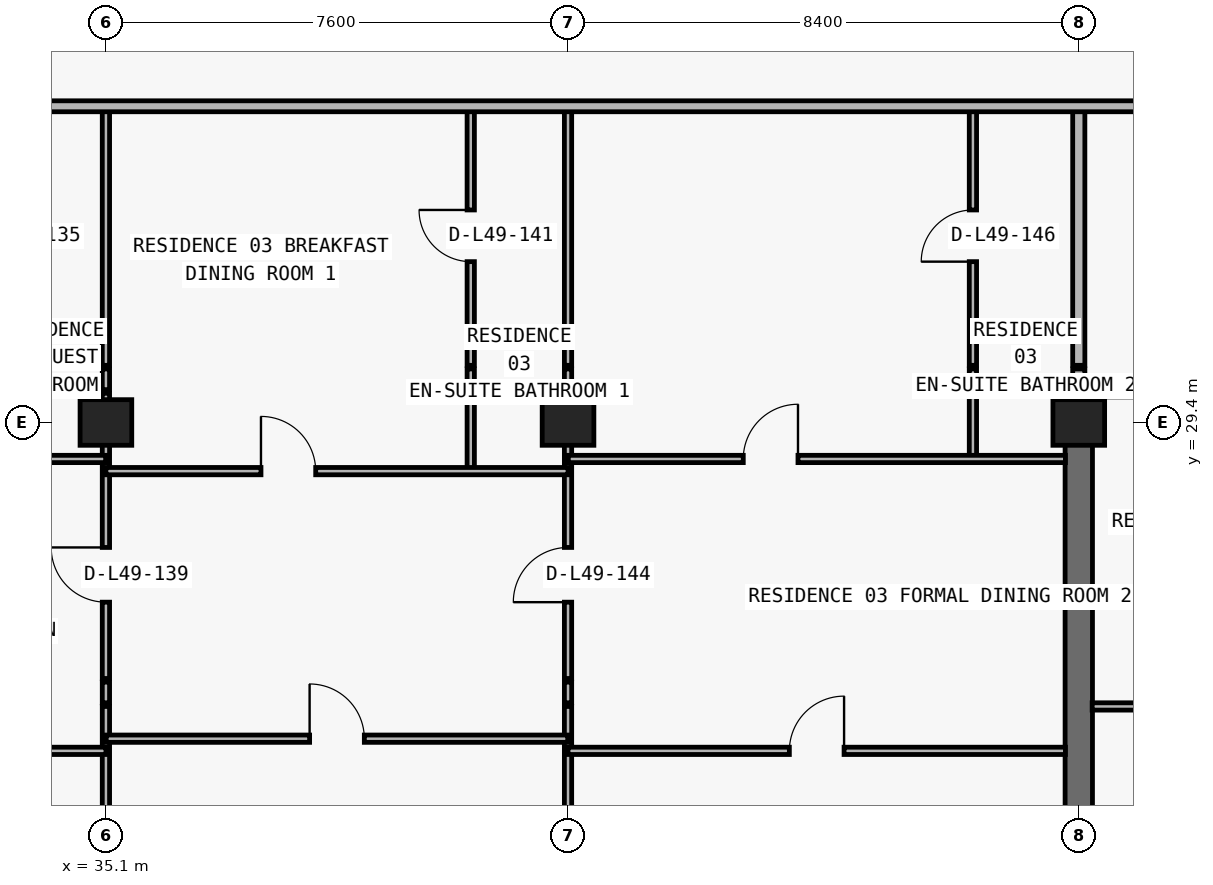
"""IFC4 building model, lengths in metres.
Left out: names, types, materials, properties, quantities, classifications, styles, units other than length and angle.
Written with IfcOpenShell. Run it as: python <this file> out.ifc"""

import sys

from ifc_helpers import new_model, si_unit, direction, frame, frame_2d, origin, origin_2d, place, context, subcontext, project, spatial, rectangle, extrude, element, fill, save


model = new_model("IFC4")
c1 = context("Model", 3, precision=1e-05, world=origin(), true_north=direction((0.0, 1.0)))
c2 = subcontext(c1, "Body", "Model", "MODEL_VIEW")
j1 = project(units=[si_unit("LENGTHUNIT", "METRE"), si_unit("PLANEANGLEUNIT", "RADIAN")], contexts=[c1])
p1 = place(None, origin())
s1 = spatial("IfcSite", under=j1, at=p1, CompositionType="ELEMENT")
p2 = place(p1, origin())
s2 = spatial("IfcBuilding", under=s1, at=p2, CompositionType="ELEMENT")
p3 = place(p2, frame((0.0, 0.0, 177.0)))
s3 = spatial("IfcBuildingStorey", under=s2, at=p3, CompositionType="ELEMENT", Elevation=177.0)
for number, where, z_axis, x_axis in (
    (1, (35.1, 29.4, 0.0), (0.0, 0.0, 1.0), (1.0, 0.0, 0.0)),
    (2, (42.7, 29.4, 0.0), (0.0, 0.0, 1.0), (1.0, 0.0, 0.0)),
    (3, (51.1, 29.4, 0.0), (0.0, 0.0, 1.0), (1.0, 0.0, 0.0)),
):
    element("IfcColumn", number, at=place(p3, frame(where, z_axis=z_axis, x_axis=x_axis)), inside=s3, PredefinedType="COLUMN", context=c2, shape_type="SweptSolid", body=[
        extrude(rectangle(XDim=0.85, YDim=0.75, at=origin_2d()), origin(), (0.0, 0.0, 1.0), 3.05),
    ])
p4 = place(p3, frame((51.1, 20.8, 0.0), z_axis=(0.0, 0.0, 1.0), x_axis=(0.0, 1.0, 0.0)))
e4 = element("IfcWall", 4, at=p4, inside=s3, PredefinedType="SHEAR", context=c2, shape_type="SweptSolid", body=[
    extrude(rectangle(XDim=8.6, YDim=0.45, at=frame_2d((4.3, 0.0))), origin(), (0.0, 0.0, 1.0), 3.05),
])
p5 = place(p3, frame((35.1, 11.24, 0.0), z_axis=(0.0, 0.0, 1.0), x_axis=(0.0, 1.0, 0.0)))
e5 = element("IfcWall", 5, at=p5, inside=s3, PredefinedType="PARTITIONING", context=c2, shape_type="SweptSolid", body=[
    extrude(rectangle(XDim=13.49, YDim=0.12, at=frame_2d((6.745, 0.0))), origin(), (0.0, 0.0, 1.0), 2.263),
])
p6 = place(p3, frame((35.1, 24.79, 0.0), z_axis=(0.0, 0.0, 1.0), x_axis=(0.0, 1.0, 0.0)))
e6 = element("IfcWall", 6, at=p6, inside=s3, PredefinedType="PARTITIONING", context=c2, shape_type="SweptSolid", body=[
    extrude(rectangle(XDim=0.34, YDim=0.12, at=frame_2d((0.17, 0.0))), origin(), (0.0, 0.0, 1.0), 2.263),
])
p7 = place(p3, frame((35.1, 25.19, 0.0), z_axis=(0.0, 0.0, 1.0), x_axis=(0.0, 1.0, 0.0)))
e7 = element("IfcWall", 7, at=p7, inside=s3, PredefinedType="PARTITIONING", context=c2, shape_type="SweptSolid", body=[
    extrude(rectangle(XDim=4.69, YDim=0.12, at=frame_2d((2.345, 0.0))), origin(), (0.0, 0.0, 1.0), 2.263),
])
p8 = place(p7, frame((1.255, 0.0, 0.0)))
e8 = element("IfcOpeningElement", 8, at=p8, cuts=e7, PredefinedType="OPENING", context=c2, shape_type="SweptSolid", body=[
    extrude(rectangle(XDim=0.9, YDim=2.15, at=frame_2d((0.45, 1.075))), frame((0.0, 0.07, 0.0), z_axis=(0.0, -1.0, 0.0), x_axis=(1.0, 0.0, 0.0)), (0.0, 0.0, 1.0), 0.14),
])
p9 = place(p3, frame((35.1, 29.94, 0.0), z_axis=(0.0, 0.0, 1.0), x_axis=(0.0, 1.0, 0.0)))
e9 = element("IfcWall", 9, at=p9, inside=s3, PredefinedType="PARTITIONING", context=c2, shape_type="SweptSolid", body=[
    extrude(rectangle(XDim=0.34, YDim=0.12, at=frame_2d((0.17, 0.0))), origin(), (0.0, 0.0, 1.0), 2.263),
])
p10 = place(p3, frame((35.1, 30.34, 0.0), z_axis=(0.0, 0.0, 1.0), x_axis=(0.0, 1.0, 0.0)))
e10 = element("IfcWall", 10, at=p10, inside=s3, PredefinedType="PARTITIONING", context=c2, shape_type="SweptSolid", body=[
    extrude(rectangle(XDim=4.26, YDim=0.12, at=frame_2d((2.13, 0.0))), origin(), (0.0, 0.0, 1.0), 2.263),
])
p11 = place(p3, frame((41.1, 28.6, 0.0), z_axis=(0.0, 0.0, 1.0), x_axis=(0.0, 1.0, 0.0)))
e11 = element("IfcWall", 11, at=p11, inside=s3, PredefinedType="PARTITIONING", context=c2, shape_type="SweptSolid", body=[
    extrude(rectangle(XDim=1.28, YDim=0.12, at=frame_2d((0.64, 0.0))), origin(), (0.0, 0.0, 1.0), 3.05),
])
p12 = place(p3, frame((41.1, 29.94, 0.0), z_axis=(0.0, 0.0, 1.0), x_axis=(0.0, 1.0, 0.0)))
e12 = element("IfcWall", 12, at=p12, inside=s3, PredefinedType="PARTITIONING", context=c2, shape_type="SweptSolid", body=[
    extrude(rectangle(XDim=0.34, YDim=0.12, at=frame_2d((0.17, 0.0))), origin(), (0.0, 0.0, 1.0), 3.05),
])
p13 = place(p3, frame((41.1, 30.34, 0.0), z_axis=(0.0, 0.0, 1.0), x_axis=(0.0, 1.0, 0.0)))
e13 = element("IfcWall", 13, at=p13, inside=s3, PredefinedType="PARTITIONING", context=c2, shape_type="SweptSolid", body=[
    extrude(rectangle(XDim=4.26, YDim=0.12, at=frame_2d((2.13, 0.0))), origin(), (0.0, 0.0, 1.0), 3.05),
])
p14 = place(p13, frame((1.705, 0.0, 0.0)))
e14 = element("IfcOpeningElement", 14, at=p14, cuts=e13, PredefinedType="OPENING", context=c2, shape_type="SweptSolid", body=[
    extrude(rectangle(XDim=0.85, YDim=2.1, at=frame_2d((0.425, 1.05))), frame((0.0, 0.07, 0.0), z_axis=(0.0, -1.0, 0.0), x_axis=(1.0, 0.0, 0.0)), (0.0, 0.0, 1.0), 0.14),
])
p15 = place(p3, frame((42.7, 11.24, 0.0), z_axis=(0.0, 0.0, 1.0), x_axis=(0.0, 1.0, 0.0)))
e15 = element("IfcWall", 15, at=p15, inside=s3, PredefinedType="PARTITIONING", context=c2, shape_type="SweptSolid", body=[
    extrude(rectangle(XDim=13.49, YDim=0.12, at=frame_2d((6.745, 0.0))), origin(), (0.0, 0.0, 1.0), 2.263),
])
p16 = place(p3, frame((42.7, 24.79, 0.0), z_axis=(0.0, 0.0, 1.0), x_axis=(0.0, 1.0, 0.0)))
e16 = element("IfcWall", 16, at=p16, inside=s3, PredefinedType="PARTITIONING", context=c2, shape_type="SweptSolid", body=[
    extrude(rectangle(XDim=0.34, YDim=0.12, at=frame_2d((0.17, 0.0))), origin(), (0.0, 0.0, 1.0), 2.263),
])
p17 = place(p3, frame((42.7, 25.19, 0.0), z_axis=(0.0, 0.0, 1.0), x_axis=(0.0, 1.0, 0.0)))
e17 = element("IfcWall", 17, at=p17, inside=s3, PredefinedType="PARTITIONING", context=c2, shape_type="SweptSolid", body=[
    extrude(rectangle(XDim=4.69, YDim=0.12, at=frame_2d((2.345, 0.0))), origin(), (0.0, 0.0, 1.0), 2.263),
])
p18 = place(p17, frame((1.255, 0.0, 0.0)))
e18 = element("IfcOpeningElement", 18, at=p18, cuts=e17, PredefinedType="OPENING", context=c2, shape_type="SweptSolid", body=[
    extrude(rectangle(XDim=0.9, YDim=2.15, at=frame_2d((0.45, 1.075))), frame((0.0, 0.07, 0.0), z_axis=(0.0, -1.0, 0.0), x_axis=(1.0, 0.0, 0.0)), (0.0, 0.0, 1.0), 0.14),
])
p19 = place(p3, frame((42.7, 29.94, 0.0), z_axis=(0.0, 0.0, 1.0), x_axis=(0.0, 1.0, 0.0)))
e19 = element("IfcWall", 19, at=p19, inside=s3, PredefinedType="PARTITIONING", context=c2, shape_type="SweptSolid", body=[
    extrude(rectangle(XDim=0.34, YDim=0.12, at=frame_2d((0.17, 0.0))), origin(), (0.0, 0.0, 1.0), 2.263),
])
p20 = place(p3, frame((42.7, 30.34, 0.0), z_axis=(0.0, 0.0, 1.0), x_axis=(0.0, 1.0, 0.0)))
e20 = element("IfcWall", 20, at=p20, inside=s3, PredefinedType="PARTITIONING", context=c2, shape_type="SweptSolid", body=[
    extrude(rectangle(XDim=4.26, YDim=0.12, at=frame_2d((2.13, 0.0))), origin(), (0.0, 0.0, 1.0), 2.263),
])
p21 = place(p3, frame((49.359, 28.8, 0.0), z_axis=(0.0, 0.0, 1.0), x_axis=(0.0, 1.0, 0.0)))
e21 = element("IfcWall", 21, at=p21, inside=s3, PredefinedType="PARTITIONING", context=c2, shape_type="SweptSolid", body=[
    extrude(rectangle(XDim=1.08, YDim=0.12, at=frame_2d((0.54, 0.0))), origin(), (0.0, 0.0, 1.0), 3.05),
])
p22 = place(p3, frame((49.359, 29.94, 0.0), z_axis=(0.0, 0.0, 1.0), x_axis=(0.0, 1.0, 0.0)))
e22 = element("IfcWall", 22, at=p22, inside=s3, PredefinedType="PARTITIONING", context=c2, shape_type="SweptSolid", body=[
    extrude(rectangle(XDim=0.34, YDim=0.12, at=frame_2d((0.17, 0.0))), origin(), (0.0, 0.0, 1.0), 3.05),
])
p23 = place(p3, frame((49.359, 30.34, 0.0), z_axis=(0.0, 0.0, 1.0), x_axis=(0.0, 1.0, 0.0)))
e23 = element("IfcWall", 23, at=p23, inside=s3, PredefinedType="PARTITIONING", context=c2, shape_type="SweptSolid", body=[
    extrude(rectangle(XDim=4.26, YDim=0.12, at=frame_2d((2.13, 0.0))), origin(), (0.0, 0.0, 1.0), 3.05),
])
p24 = place(p23, frame((1.705, 0.0, 0.0)))
e24 = element("IfcOpeningElement", 24, at=p24, cuts=e23, PredefinedType="OPENING", context=c2, shape_type="SweptSolid", body=[
    extrude(rectangle(XDim=0.85, YDim=2.1, at=frame_2d((0.425, 1.05))), frame((0.0, 0.07, 0.0), z_axis=(0.0, -1.0, 0.0), x_axis=(1.0, 0.0, 0.0)), (0.0, 0.0, 1.0), 0.14),
])
p25 = place(p3, frame((51.1, 29.405, 0.0), z_axis=(0.0, 0.0, 1.0), x_axis=(0.0, 1.0, 0.0)))
e25 = element("IfcWall", 25, at=p25, inside=s3, PredefinedType="PARTITIONING", context=c2, shape_type="SweptSolid", body=[
    extrude(rectangle(XDim=0.475, YDim=0.2, at=frame_2d((0.237, 0.0))), origin(), (0.0, 0.0, 1.0), 2.335),
])
p26 = place(p3, frame((51.1, 29.94, 0.0), z_axis=(0.0, 0.0, 1.0), x_axis=(0.0, 1.0, 0.0)))
e26 = element("IfcWall", 26, at=p26, inside=s3, PredefinedType="PARTITIONING", context=c2, shape_type="SweptSolid", body=[
    extrude(rectangle(XDim=0.34, YDim=0.2, at=frame_2d((0.17, 0.0))), origin(), (0.0, 0.0, 1.0), 2.335),
])
p27 = place(p3, frame((51.1, 30.34, 0.0), z_axis=(0.0, 0.0, 1.0), x_axis=(0.0, 1.0, 0.0)))
e27 = element("IfcWall", 27, at=p27, inside=s3, PredefinedType="PARTITIONING", context=c2, shape_type="SweptSolid", body=[
    extrude(rectangle(XDim=4.26, YDim=0.2, at=frame_2d((2.13, 0.0))), origin(), (0.0, 0.0, 1.0), 2.335),
])
p28 = place(p3, frame((26.92, 24.0, 0.0), z_axis=(0.0, 0.0, 1.0), x_axis=(1.0, 0.0, 0.0)))
e28 = element("IfcWall", 28, at=p28, inside=s3, PredefinedType="PARTITIONING", context=c2, shape_type="SweptSolid", body=[
    extrude(rectangle(XDim=8.18, YDim=0.12, at=frame_2d((4.09, 0.0))), origin(), (0.0, 0.0, 1.0), 3.05),
])
p29 = place(p28, frame((1.33, 0.0, 0.0)))
e29 = element("IfcOpeningElement", 29, at=p29, cuts=e28, PredefinedType="OPENING", context=c2, shape_type="SweptSolid", body=[
    extrude(rectangle(XDim=0.9, YDim=2.15, at=frame_2d((0.45, 1.075))), frame((0.0, 0.07, 0.0), z_axis=(0.0, -1.0, 0.0), x_axis=(1.0, 0.0, 0.0)), (0.0, 0.0, 1.0), 0.14),
])
p30 = place(p3, frame((42.7, 24.0, 0.0), z_axis=(0.0, 0.0, 1.0), x_axis=(1.0, 0.0, 0.0)))
e30 = element("IfcWall", 30, at=p30, inside=s3, PredefinedType="PARTITIONING", context=c2, shape_type="SweptSolid", body=[
    extrude(rectangle(XDim=8.18, YDim=0.12, at=frame_2d((4.09, 0.0))), origin(), (0.0, 0.0, 1.0), 3.05),
])
p31 = place(p30, frame((3.64, 0.0, 0.0)))
e31 = element("IfcOpeningElement", 31, at=p31, cuts=e30, PredefinedType="OPENING", context=c2, shape_type="SweptSolid", body=[
    extrude(rectangle(XDim=0.9, YDim=2.15, at=frame_2d((0.45, 1.075))), frame((0.0, 0.07, 0.0), z_axis=(0.0, -1.0, 0.0), x_axis=(1.0, 0.0, 0.0)), (0.0, 0.0, 1.0), 0.14),
])
p32 = place(p3, frame((35.105, 24.2, 0.0), z_axis=(0.0, 0.0, 1.0), x_axis=(1.0, 0.0, 0.0)))
e32 = element("IfcWall", 32, at=p32, inside=s3, PredefinedType="PARTITIONING", context=c2, shape_type="SweptSolid", body=[
    extrude(rectangle(XDim=7.59, YDim=0.12, at=frame_2d((3.795, 0.0))), origin(), (0.0, 0.0, 1.0), 3.05),
])
p33 = place(p32, frame((3.345, 0.0, 0.0)))
e33 = element("IfcOpeningElement", 33, at=p33, cuts=e32, PredefinedType="OPENING", context=c2, shape_type="SweptSolid", body=[
    extrude(rectangle(XDim=0.9, YDim=2.15, at=frame_2d((0.45, 1.075))), frame((0.0, 0.07, 0.0), z_axis=(0.0, -1.0, 0.0), x_axis=(1.0, 0.0, 0.0)), (0.0, 0.0, 1.0), 0.14),
])
p34 = place(p3, frame((51.32, 24.73, 0.0), z_axis=(0.0, 0.0, 1.0), x_axis=(1.0, 0.0, 0.0)))
e34 = element("IfcWall", 34, at=p34, inside=s3, PredefinedType="PARTITIONING", context=c2, shape_type="SweptSolid", body=[
    extrude(rectangle(XDim=8.18, YDim=0.12, at=frame_2d((4.09, 0.0))), origin(), (0.0, 0.0, 1.0), 3.05),
])
p35 = place(p34, frame((1.583, 0.0, 0.0)))
e35 = element("IfcOpeningElement", 35, at=p35, cuts=e34, PredefinedType="OPENING", context=c2, shape_type="SweptSolid", body=[
    extrude(rectangle(XDim=0.9, YDim=2.15, at=frame_2d((0.45, 1.075))), frame((0.0, 0.07, 0.0), z_axis=(0.0, -1.0, 0.0), x_axis=(1.0, 0.0, 0.0)), (0.0, 0.0, 1.0), 0.14),
])
p36 = place(p34, frame((5.84, 0.0, 0.0)))
e36 = element("IfcOpeningElement", 36, at=p36, cuts=e34, PredefinedType="OPENING", context=c2, shape_type="SweptSolid", body=[
    extrude(rectangle(XDim=0.9, YDim=2.15, at=frame_2d((0.45, 1.075))), frame((0.0, 0.07, 0.0), z_axis=(0.0, -1.0, 0.0), x_axis=(1.0, 0.0, 0.0)), (0.0, 0.0, 1.0), 0.14),
])
p37 = place(p3, frame((35.1, 28.6, 0.0), z_axis=(0.0, 0.0, 1.0), x_axis=(1.0, 0.0, 0.0)))
e37 = element("IfcWall", 37, at=p37, inside=s3, PredefinedType="PARTITIONING", context=c2, shape_type="SweptSolid", body=[
    extrude(rectangle(XDim=7.6, YDim=0.12, at=frame_2d((3.8, 0.0))), origin(), (0.0, 0.0, 1.0), 3.05),
])
p38 = place(p37, frame((2.55, 0.0, 0.0)))
e38 = element("IfcOpeningElement", 38, at=p38, cuts=e37, PredefinedType="OPENING", context=c2, shape_type="SweptSolid", body=[
    extrude(rectangle(XDim=0.9, YDim=2.15, at=frame_2d((0.45, 1.075))), frame((0.0, 0.07, 0.0), z_axis=(0.0, -1.0, 0.0), x_axis=(1.0, 0.0, 0.0)), (0.0, 0.0, 1.0), 0.14),
])
p39 = place(p3, frame((26.92, 28.8, 0.0), z_axis=(0.0, 0.0, 1.0), x_axis=(1.0, 0.0, 0.0)))
e39 = element("IfcWall", 39, at=p39, inside=s3, PredefinedType="PARTITIONING", context=c2, shape_type="SweptSolid", body=[
    extrude(rectangle(XDim=8.175, YDim=0.12, at=frame_2d((4.087, 0.0))), origin(), (0.0, 0.0, 1.0), 3.05),
])
p40 = place(p39, frame((1.33, 0.0, 0.0)))
e40 = element("IfcOpeningElement", 40, at=p40, cuts=e39, PredefinedType="OPENING", context=c2, shape_type="SweptSolid", body=[
    extrude(rectangle(XDim=0.9, YDim=2.15, at=frame_2d((0.45, 1.075))), frame((0.0, 0.07, 0.0), z_axis=(0.0, -1.0, 0.0), x_axis=(1.0, 0.0, 0.0)), (0.0, 0.0, 1.0), 0.14),
])
p41 = place(p3, frame((42.705, 28.8, 0.0), z_axis=(0.0, 0.0, 1.0), x_axis=(1.0, 0.0, 0.0)))
e41 = element("IfcWall", 41, at=p41, inside=s3, PredefinedType="PARTITIONING", context=c2, shape_type="SweptSolid", body=[
    extrude(rectangle(XDim=8.175, YDim=0.12, at=frame_2d((4.087, 0.0))), origin(), (0.0, 0.0, 1.0), 3.05),
])
p42 = place(p41, frame((2.877, 0.0, 0.0)))
e42 = element("IfcOpeningElement", 42, at=p42, cuts=e41, PredefinedType="OPENING", context=c2, shape_type="SweptSolid", body=[
    extrude(rectangle(XDim=0.9, YDim=2.15, at=frame_2d((0.45, 1.075))), frame((0.0, 0.07, 0.0), z_axis=(0.0, -1.0, 0.0), x_axis=(1.0, 0.0, 0.0)), (0.0, 0.0, 1.0), 0.14),
])
p43 = place(p3, frame((51.1, 29.88, 0.0), z_axis=(0.0, 0.0, 1.0), x_axis=(1.0, 0.0, 0.0)))
e43 = element("IfcWall", 43, at=p43, inside=s3, PredefinedType="PARTITIONING", context=c2, shape_type="SweptSolid", body=[
    extrude(rectangle(XDim=8.4, YDim=0.12, at=frame_2d((4.2, 0.0))), origin(), (0.0, 0.0, 1.0), 3.05),
])
p44 = place(p43, frame((1.693, 0.0, 0.0)))
e44 = element("IfcOpeningElement", 44, at=p44, cuts=e43, PredefinedType="OPENING", context=c2, shape_type="SweptSolid", body=[
    extrude(rectangle(XDim=0.9, YDim=2.15, at=frame_2d((0.45, 1.075))), frame((0.0, 0.07, 0.0), z_axis=(0.0, -1.0, 0.0), x_axis=(1.0, 0.0, 0.0)), (0.0, 0.0, 1.0), 0.14),
])
p45 = place(p3, frame((18.3, 34.6, 0.0), z_axis=(0.0, 0.0, 1.0), x_axis=(1.0, 0.0, 0.0)))
e45 = element("IfcWall", 45, at=p45, inside=s3, PredefinedType="PARTITIONING", context=c2, shape_type="SweptSolid", body=[
    extrude(rectangle(XDim=41.2, YDim=0.18, at=frame_2d((20.6, 0.0))), origin(), (0.0, 0.0, 1.0), 3.05),
])
p46 = place(p45, frame((2.67, 0.0, 0.0)))
e46 = element("IfcOpeningElement", 46, at=p46, cuts=e45, PredefinedType="OPENING", context=c2, shape_type="SweptSolid", body=[
    extrude(rectangle(XDim=1.0, YDim=2.2, at=frame_2d((0.5, 1.1))), frame((0.0, 0.1, 0.0), z_axis=(0.0, -1.0, 0.0), x_axis=(1.0, 0.0, 0.0)), (0.0, 0.0, 1.0), 0.2),
])
p47 = place(p45, frame((11.212, 0.0, 0.0)))
e47 = element("IfcOpeningElement", 47, at=p47, cuts=e45, PredefinedType="OPENING", context=c2, shape_type="SweptSolid", body=[
    extrude(rectangle(XDim=1.0, YDim=2.2, at=frame_2d((0.5, 1.1))), frame((0.0, 0.1, 0.0), z_axis=(0.0, -1.0, 0.0), x_axis=(1.0, 0.0, 0.0)), (0.0, 0.0, 1.0), 0.2),
])
p48 = place(p45, frame((35.483, 0.0, 0.0)))
e48 = element("IfcOpeningElement", 48, at=p48, cuts=e45, PredefinedType="OPENING", context=c2, shape_type="SweptSolid", body=[
    extrude(rectangle(XDim=1.0, YDim=2.2, at=frame_2d((0.5, 1.1))), frame((0.0, 0.1, 0.0), z_axis=(0.0, -1.0, 0.0), x_axis=(1.0, 0.0, 0.0)), (0.0, 0.0, 1.0), 0.2),
])
p49 = place(p8, origin())
e49 = element("IfcDoor", 49, at=p49, inside=s3, OperationType="SINGLE_SWING_RIGHT", PredefinedType="DOOR", context=c2, shape_type="SweptSolid", body=[
    extrude(rectangle(XDim=0.9, YDim=2.15, at=frame_2d((0.45, 1.075))), frame((0.0, 0.025, 0.0), z_axis=(0.0, -1.0, 0.0), x_axis=(1.0, 0.0, 0.0)), (0.0, 0.0, 1.0), 0.05),
])
fill(e8, e49)
p50 = place(p38, origin())
e50 = element("IfcDoor", 50, at=p50, inside=s3, OperationType="SINGLE_SWING_LEFT", PredefinedType="DOOR", context=c2, shape_type="SweptSolid", body=[
    extrude(rectangle(XDim=0.9, YDim=2.15, at=frame_2d((0.45, 1.075))), frame((0.0, 0.025, 0.0), z_axis=(0.0, -1.0, 0.0), x_axis=(1.0, 0.0, 0.0)), (0.0, 0.0, 1.0), 0.05),
])
fill(e38, e50)
p51 = place(p14, origin())
e51 = element("IfcDoor", 51, at=p51, inside=s3, OperationType="SINGLE_SWING_RIGHT", PredefinedType="DOOR", context=c2, shape_type="SweptSolid", body=[
    extrude(rectangle(XDim=0.85, YDim=2.1, at=frame_2d((0.425, 1.05))), frame((0.0, 0.025, 0.0), z_axis=(0.0, -1.0, 0.0), x_axis=(1.0, 0.0, 0.0)), (0.0, 0.0, 1.0), 0.05),
])
fill(e14, e51)
p52 = place(p33, origin())
e52 = element("IfcDoor", 52, at=p52, inside=s3, OperationType="SINGLE_SWING_LEFT", PredefinedType="DOOR", context=c2, shape_type="SweptSolid", body=[
    extrude(rectangle(XDim=0.9, YDim=2.15, at=frame_2d((0.45, 1.075))), frame((0.0, 0.025, 0.0), z_axis=(0.0, -1.0, 0.0), x_axis=(1.0, 0.0, 0.0)), (0.0, 0.0, 1.0), 0.05),
])
fill(e33, e52)
p53 = place(p18, origin())
e53 = element("IfcDoor", 53, at=p53, inside=s3, OperationType="SINGLE_SWING_LEFT", PredefinedType="DOOR", context=c2, shape_type="SweptSolid", body=[
    extrude(rectangle(XDim=0.9, YDim=2.15, at=frame_2d((0.45, 1.075))), frame((0.0, 0.025, 0.0), z_axis=(0.0, -1.0, 0.0), x_axis=(1.0, 0.0, 0.0)), (0.0, 0.0, 1.0), 0.05),
])
fill(e18, e53)
p54 = place(p42, origin())
e54 = element("IfcDoor", 54, at=p54, inside=s3, OperationType="SINGLE_SWING_RIGHT", PredefinedType="DOOR", context=c2, shape_type="SweptSolid", body=[
    extrude(rectangle(XDim=0.9, YDim=2.15, at=frame_2d((0.45, 1.075))), frame((0.0, 0.025, 0.0), z_axis=(0.0, -1.0, 0.0), x_axis=(1.0, 0.0, 0.0)), (0.0, 0.0, 1.0), 0.05),
])
fill(e42, e54)
p55 = place(p24, origin())
e55 = element("IfcDoor", 55, at=p55, inside=s3, OperationType="SINGLE_SWING_LEFT", PredefinedType="DOOR", context=c2, shape_type="SweptSolid", body=[
    extrude(rectangle(XDim=0.85, YDim=2.1, at=frame_2d((0.425, 1.05))), frame((0.0, 0.025, 0.0), z_axis=(0.0, -1.0, 0.0), x_axis=(1.0, 0.0, 0.0)), (0.0, 0.0, 1.0), 0.05),
])
fill(e24, e55)
p56 = place(p31, origin())
e56 = element("IfcDoor", 56, at=p56, inside=s3, OperationType="SINGLE_SWING_RIGHT", PredefinedType="DOOR", context=c2, shape_type="SweptSolid", body=[
    extrude(rectangle(XDim=0.9, YDim=2.15, at=frame_2d((0.45, 1.075))), frame((0.0, 0.025, 0.0), z_axis=(0.0, -1.0, 0.0), x_axis=(1.0, 0.0, 0.0)), (0.0, 0.0, 1.0), 0.05),
])
fill(e31, e56)
save(model, sys.argv[1])
